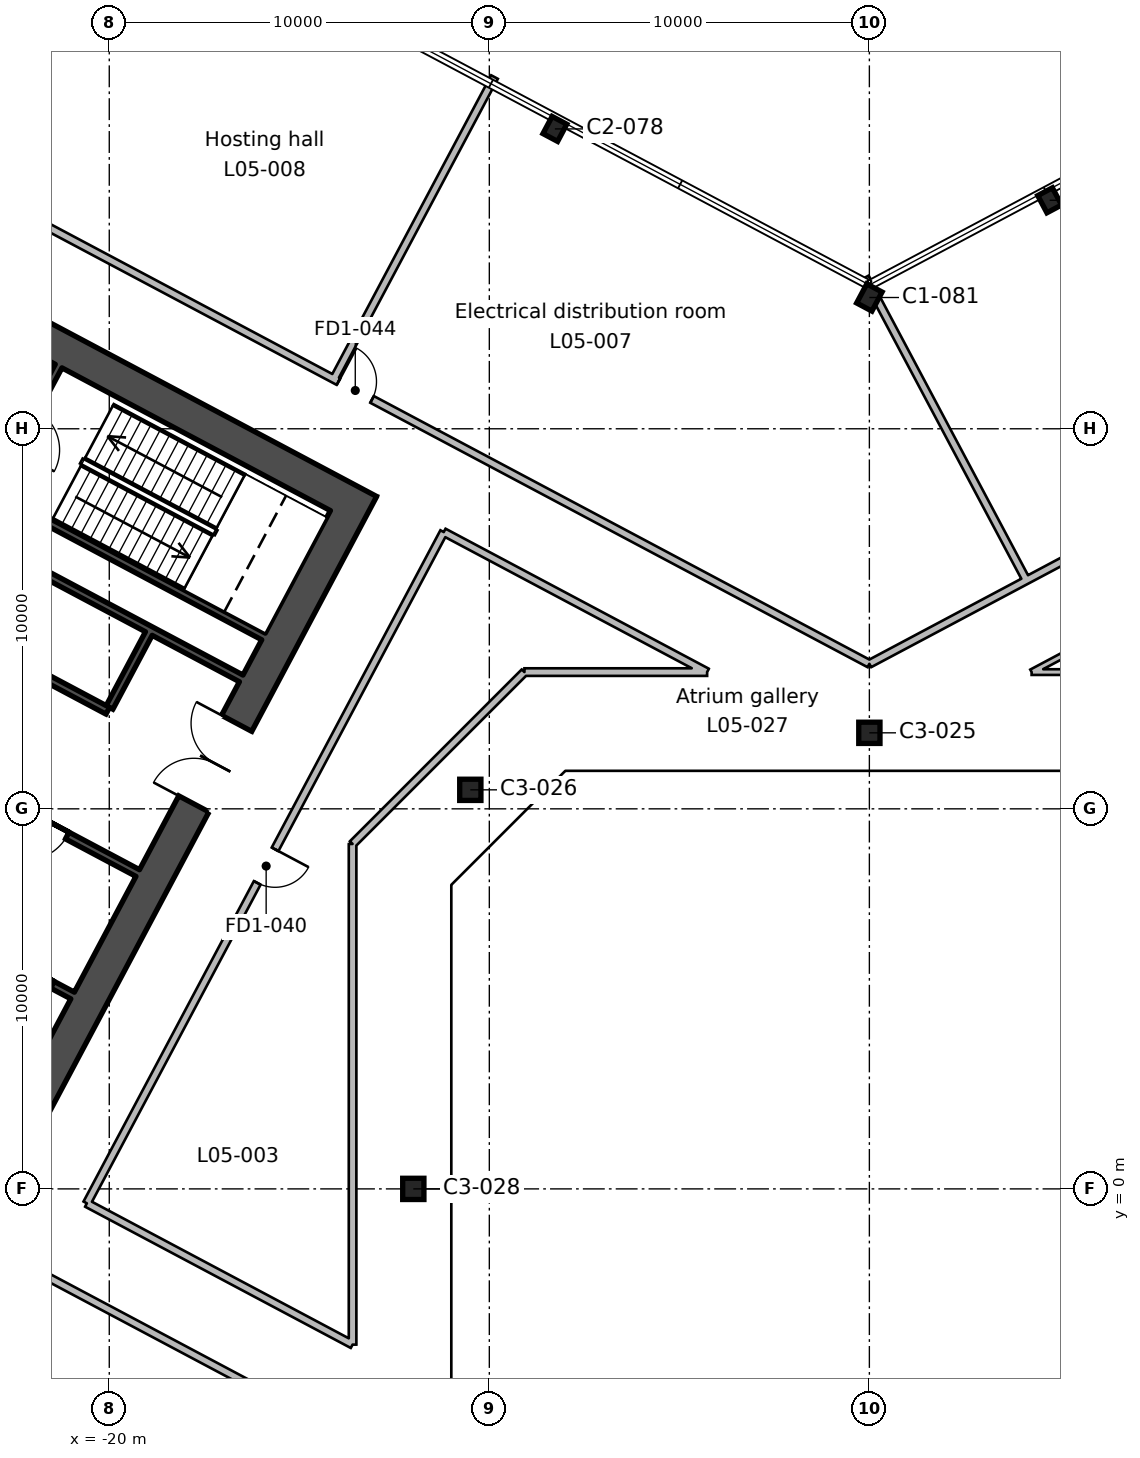
"""IFC4 building model, lengths in metres.
Left out: names, types, materials, properties, quantities, classifications, styles, units other than length and angle.
Written with IfcOpenShell. Run it as: python <this file> out.ifc"""

import sys

from ifc_helpers import new_model, si_unit, direction, frame, frame_2d, origin, origin_2d, place, context, subcontext, project, spatial, rectangle, hollow_rectangle, i_section, extrude, element, fill, save


model = new_model("IFC4")
c1 = context("Model", 3, precision=1e-05, world=origin(), true_north=direction((0.0, 1.0)))
c2 = subcontext(c1, "Body", "Model", "MODEL_VIEW")
j1 = project(units=[si_unit("LENGTHUNIT", "METRE"), si_unit("PLANEANGLEUNIT", "RADIAN")], contexts=[c1])
p1 = place(None, origin())
s1 = spatial("IfcSite", under=j1, at=p1, CompositionType="ELEMENT")
p2 = place(p1, origin())
s2 = spatial("IfcBuilding", under=s1, at=p2, CompositionType="ELEMENT")
p3 = place(p2, frame((0.0, 0.0, 28.4)))
s3 = spatial("IfcBuildingStorey", under=s2, at=p3, CompositionType="ELEMENT", Elevation=28.4)
for number, where, z_axis, x_axis in (
    (1, (-12.0, 0.0, 0.0), (0.0, 0.0, 1.0), (1.0, 0.0, 0.0)),
    (2, (-10.5, 10.5, 0.0), (0.0, 0.0, 1.0), (1.0, 0.0, 0.0)),
    (3, (0.0, 12.0, 0.0), (0.0, 0.0, 1.0), (1.0, 0.0, 0.0)),
):
    element("IfcColumn", number, at=place(p3, frame(where, z_axis=z_axis, x_axis=x_axis)), inside=s3, PredefinedType="COLUMN", context=c2, shape_type="SweptSolid", body=[
        extrude(hollow_rectangle(XDim=0.559, YDim=0.559, WallThickness=0.024, InnerFilletRadius=0.012, OuterFilletRadius=0.035, at=origin_2d()), origin(), (0.0, 0.0, 1.0), 5.4),
    ])
p4 = place(p3, frame((0.0, 23.454, 0.0), z_axis=(0.0, 0.0, 1.0), x_axis=(-0.882947592859, 0.469471562786, 0.0)))
e4 = element("IfcColumn", 4, at=p4, inside=s3, PredefinedType="COLUMN", context=c2, shape_type="SweptSolid", body=[
    extrude(i_section(OverallWidth=0.455, OverallDepth=0.569, WebThickness=0.078, FlangeThickness=0.125, FilletRadius=0.015, at=origin_2d()), origin(), (0.0, 0.0, 1.0), 5.4),
])
for number, where, z_axis, x_axis in (
    (5, (4.744, 26.012, 0.0), (0.0, 0.0, 1.0), (-0.883, -0.469, 0.0)),
    (6, (-8.275, 27.89, 0.0), (0.0, 0.0, 1.0), (-0.883, 0.469, 0.0)),
):
    element("IfcColumn", number, at=place(p3, frame(where, z_axis=z_axis, x_axis=x_axis)), inside=s3, PredefinedType="COLUMN", context=c2, shape_type="SweptSolid", body=[
        extrude(i_section(OverallWidth=0.437, OverallDepth=0.513, WebThickness=0.061, FlangeThickness=0.097, FilletRadius=0.015, at=origin_2d()), origin(), (0.0, 0.0, 1.0), 5.4),
    ])
p5 = place(p3, frame((-13.362, 18.43, 0.0), z_axis=(0.0, 0.0, 1.0), x_axis=(-0.46947084998, -0.882947971864, 0.0)))
e7 = element("IfcWall", 7, at=p5, inside=s3, PredefinedType="SHEAR", context=c2, shape_type="SweptSolid", body=[
    extrude(rectangle(XDim=20.0, YDim=0.9, at=frame_2d((10.0, 0.0))), origin(), (0.0, 0.0, 1.0), 5.4),
])
p6 = place(p5, frame((7.0, 0.0, 0.0)))
e8 = element("IfcOpeningElement", 8, at=p6, cuts=e7, PredefinedType="OPENING", context=c2, shape_type="SweptSolid", body=[
    extrude(rectangle(XDim=2.4, YDim=2.4, at=frame_2d((1.2, 1.2))), frame((0.0, 0.46, 0.0), z_axis=(0.0, -1.0, 0.0), x_axis=(1.0, 0.0, 0.0)), (0.0, 0.0, 1.0), 0.92),
])
p7 = place(p3, frame((-13.97, 18.244, 0.0), z_axis=(0.0, 0.0, 1.0), x_axis=(-0.88294509198, 0.469476266226, 0.0)))
e9 = element("IfcWall", 9, at=p7, inside=s3, PredefinedType="SHEAR", context=c2, shape_type="SweptSolid", body=[
    extrude(rectangle(XDim=20.2, YDim=0.9, at=frame_2d((10.1, 0.0))), origin(), (0.0, 0.0, 1.0), 5.4),
])
p8 = place(p3, frame((-18.96, 14.611, 0.0), z_axis=(0.0, 0.0, 1.0), x_axis=(-0.4694473164, -0.882960484464, 0.0)))
e10 = element("IfcWall", 10, at=p8, inside=s3, PredefinedType="SHEAR", context=c2, shape_type="SweptSolid", body=[
    extrude(rectangle(XDim=2.2, YDim=0.2, at=frame_2d((1.1, 0.0))), origin(), (0.0, 0.0, 1.0), 5.4),
])
p9 = place(p3, frame((-21.333, 21.649, 0.0), z_axis=(0.0, 0.0, 1.0), x_axis=(-0.469494272526, -0.882935517501, 0.0)))
e11 = element("IfcWall", 11, at=p9, inside=s3, PredefinedType="SHEAR", context=c2, shape_type="SweptSolid", body=[
    extrude(rectangle(XDim=7.3, YDim=0.2, at=frame_2d((3.65, 0.0))), origin(), (0.0, 0.0, 1.0), 5.4),
])
p10 = place(p9, frame((1.3, 0.0, 0.0)))
e12 = element("IfcOpeningElement", 12, at=p10, cuts=e11, PredefinedType="OPENING", context=c2, shape_type="SweptSolid", body=[
    extrude(rectangle(XDim=1.2, YDim=2.1, at=frame_2d((0.6, 1.05))), frame((0.0, 0.11, 0.0), z_axis=(0.0, -1.0, 0.0), x_axis=(1.0, 0.0, 0.0)), (0.0, 0.0, 1.0), 0.22),
])
p11 = place(p3, frame((-15.942, 14.536, 0.0), z_axis=(0.0, 0.0, 1.0), x_axis=(-0.882946947542, 0.469472776449, 0.0)))
e13 = element("IfcWall", 13, at=p11, inside=s3, PredefinedType="SHEAR", context=c2, shape_type="SweptSolid", body=[
    extrude(rectangle(XDim=8.0, YDim=0.2, at=frame_2d((4.0, 0.0))), origin(), (0.0, 0.0, 1.0), 5.4),
])
p12 = place(p3, frame((-16.529, 13.432, 0.0), z_axis=(0.0, 0.0, 1.0), x_axis=(-0.88295287151, 0.469461634952, 0.0)))
e14 = element("IfcWall", 14, at=p12, inside=s3, PredefinedType="SHEAR", context=c2, shape_type="SweptSolid", body=[
    extrude(rectangle(XDim=8.0, YDim=0.2, at=frame_2d((4.0, 0.0))), origin(), (0.0, 0.0, 1.0), 5.4),
])
p13 = place(p3, frame((-20.04, 12.581, 0.0), z_axis=(0.0, 0.0, 1.0), x_axis=(-0.882942972946, 0.469480251476, 0.0)))
e15 = element("IfcWall", 15, at=p13, inside=s3, PredefinedType="SHEAR", context=c2, shape_type="SweptSolid", body=[
    extrude(rectangle(XDim=5.4, YDim=0.2, at=frame_2d((2.7, 0.0))), origin(), (0.0, 0.0, 1.0), 5.4),
])
p14 = place(p13, frame((2.25, 0.0, 0.0)))
e16 = element("IfcOpeningElement", 16, at=p14, cuts=e15, PredefinedType="OPENING", context=c2, shape_type="SweptSolid", body=[
    extrude(rectangle(XDim=0.9, YDim=2.1, at=frame_2d((0.45, 1.05))), frame((0.0, 0.11, 0.0), z_axis=(0.0, -1.0, 0.0), x_axis=(1.0, 0.0, 0.0)), (0.0, 0.0, 1.0), 0.22),
])
p15 = place(p3, frame((-19.252, 8.311, 0.0), z_axis=(0.0, 0.0, 1.0), x_axis=(-0.882955722218, 0.469456273365, 0.0)))
e17 = element("IfcWall", 17, at=p15, inside=s3, PredefinedType="SHEAR", context=c2, shape_type="SweptSolid", body=[
    extrude(rectangle(XDim=10.0, YDim=0.2, at=frame_2d((5.0, 0.0))), origin(), (0.0, 0.0, 1.0), 5.4),
])
p16 = place(p15, frame((2.1, 0.0, 0.0)))
e18 = element("IfcOpeningElement", 18, at=p16, cuts=e17, PredefinedType="OPENING", context=c2, shape_type="SweptSolid", body=[
    extrude(rectangle(XDim=1.2, YDim=2.1, at=frame_2d((0.6, 1.05))), frame((0.0, 0.11, 0.0), z_axis=(0.0, -1.0, 0.0), x_axis=(1.0, 0.0, 0.0)), (0.0, 0.0, 1.0), 0.22),
])
p17 = place(p3, frame((-20.965, 5.088, 0.0), z_axis=(0.0, 0.0, 1.0), x_axis=(-0.882925986334, 0.469512196493, 0.0)))
e19 = element("IfcWall", 19, at=p17, inside=s3, PredefinedType="SHEAR", context=c2, shape_type="SweptSolid", body=[
    extrude(rectangle(XDim=4.5, YDim=0.2, at=frame_2d((2.25, 0.0))), origin(), (0.0, 0.0, 1.0), 5.4),
])
p18 = place(p17, frame((0.6, 0.0, 0.0)))
e20 = element("IfcOpeningElement", 20, at=p18, cuts=e19, PredefinedType="OPENING", context=c2, shape_type="SweptSolid", body=[
    extrude(rectangle(XDim=1.1, YDim=2.1, at=frame_2d((0.55, 1.05))), frame((0.0, 0.11, 0.0), z_axis=(0.0, -1.0, 0.0), x_axis=(1.0, 0.0, 0.0)), (0.0, 0.0, 1.0), 0.22),
])
p19 = place(p3, frame((-48.814, 39.77, 0.0), z_axis=(0.0, 0.0, 1.0), x_axis=(0.882945848707, -0.469474843043, 0.0)))
e21 = element("IfcWall", 21, at=p19, inside=s3, PredefinedType="PARTITIONING", context=c2, shape_type="SweptSolid", body=[
    extrude(rectangle(XDim=55.285, YDim=0.2, at=frame_2d((27.643, 0.0))), origin(), (0.0, 0.0, 1.0), 4.95),
])
p20 = place(p19, frame((39.465, 0.0, 0.0)))
e22 = element("IfcOpeningElement", 22, at=p20, cuts=e21, PredefinedType="OPENING", context=c2, shape_type="SweptSolid", body=[
    extrude(rectangle(XDim=1.0, YDim=2.1, at=frame_2d((0.5, 1.05))), frame((0.0, 0.11, 0.0), z_axis=(0.0, -1.0, 0.0), x_axis=(1.0, 0.0, 0.0)), (0.0, 0.0, 1.0), 0.22),
])
p21 = place(p19, frame((27.366, 0.0, 0.0)))
e23 = element("IfcOpeningElement", 23, at=p21, cuts=e21, PredefinedType="OPENING", context=c2, shape_type="SweptSolid", body=[
    extrude(rectangle(XDim=1.0, YDim=2.1, at=frame_2d((0.5, 1.05))), frame((0.0, 0.11, 0.0), z_axis=(0.0, -1.0, 0.0), x_axis=(1.0, 0.0, 0.0)), (0.0, 0.0, 1.0), 0.22),
])
p22 = place(p19, frame((15.665, 0.0, 0.0)))
e24 = element("IfcOpeningElement", 24, at=p22, cuts=e21, PredefinedType="OPENING", context=c2, shape_type="SweptSolid", body=[
    extrude(rectangle(XDim=1.0, YDim=2.1, at=frame_2d((0.5, 1.05))), frame((0.0, 0.11, 0.0), z_axis=(0.0, -1.0, 0.0), x_axis=(1.0, 0.0, 0.0)), (0.0, 0.0, 1.0), 0.22),
])
p23 = place(p3, frame((0.0, 13.815, 0.0), z_axis=(0.0, 0.0, 1.0), x_axis=(0.882946053005, 0.469474458819, 0.0)))
e25 = element("IfcWall", 25, at=p23, inside=s3, PredefinedType="PARTITIONING", context=c2, shape_type="SweptSolid", body=[
    extrude(rectangle(XDim=65.714, YDim=0.2, at=frame_2d((32.857, 0.0))), origin(), (0.0, 0.0, 1.0), 4.95),
])
p24 = place(p23, frame((35.65, 0.0, 0.0)))
e26 = element("IfcOpeningElement", 26, at=p24, cuts=e25, PredefinedType="OPENING", context=c2, shape_type="SweptSolid", body=[
    extrude(rectangle(XDim=1.0, YDim=2.1, at=frame_2d((0.5, 1.05))), frame((0.0, 0.11, 0.0), z_axis=(0.0, -1.0, 0.0), x_axis=(1.0, 0.0, 0.0)), (0.0, 0.0, 1.0), 0.22),
])
p25 = place(p23, frame((32.15, 0.0, 0.0)))
e27 = element("IfcOpeningElement", 27, at=p25, cuts=e25, PredefinedType="OPENING", context=c2, shape_type="SweptSolid", body=[
    extrude(rectangle(XDim=1.0, YDim=2.1, at=frame_2d((0.5, 1.05))), frame((0.0, 0.11, 0.0), z_axis=(0.0, -1.0, 0.0), x_axis=(1.0, 0.0, 0.0)), (0.0, 0.0, 1.0), 0.22),
])
p26 = place(p23, frame((19.25, 0.0, 0.0)))
e28 = element("IfcOpeningElement", 28, at=p26, cuts=e25, PredefinedType="OPENING", context=c2, shape_type="SweptSolid", body=[
    extrude(rectangle(XDim=1.0, YDim=2.1, at=frame_2d((0.5, 1.05))), frame((0.0, 0.11, 0.0), z_axis=(0.0, -1.0, 0.0), x_axis=(1.0, 0.0, 0.0)), (0.0, 0.0, 1.0), 0.22),
])
p27 = place(p3, frame((-13.598, -6.585, 0.0), z_axis=(0.0, 0.0, 1.0), x_axis=(-0.882949042681, 0.469468836057, 0.0)))
e29 = element("IfcWall", 29, at=p27, inside=s3, PredefinedType="PARTITIONING", context=c2, shape_type="SweptSolid", body=[
    extrude(rectangle(XDim=35.059, YDim=0.2, at=frame_2d((17.529, 0.0))), origin(), (0.0, 0.0, 1.0), 4.95),
])
p28 = place(p27, frame((25.65, 0.0, 0.0)))
e30 = element("IfcOpeningElement", 30, at=p28, cuts=e29, PredefinedType="OPENING", context=c2, shape_type="SweptSolid", body=[
    extrude(rectangle(XDim=1.0, YDim=2.1, at=frame_2d((0.5, 1.05))), frame((0.0, 0.11, 0.0), z_axis=(0.0, -1.0, 0.0), x_axis=(1.0, 0.0, 0.0)), (0.0, 0.0, 1.0), 0.22),
])
p29 = place(p27, frame((17.05, 0.0, 0.0)))
e31 = element("IfcOpeningElement", 31, at=p29, cuts=e29, PredefinedType="OPENING", context=c2, shape_type="SweptSolid", body=[
    extrude(rectangle(XDim=1.0, YDim=2.1, at=frame_2d((0.5, 1.05))), frame((0.0, 0.11, 0.0), z_axis=(0.0, -1.0, 0.0), x_axis=(1.0, 0.0, 0.0)), (0.0, 0.0, 1.0), 0.22),
])
p30 = place(p3, frame((-9.864, 29.255, 0.0), z_axis=(0.0, 0.0, 1.0), x_axis=(-0.469475779988, -0.88294535052, 0.0)))
e32 = element("IfcWall", 32, at=p30, inside=s3, PredefinedType="PARTITIONING", context=c2, shape_type="SweptSolid", body=[
    extrude(rectangle(XDim=9.002, YDim=0.2, at=frame_2d((4.501, 0.0))), origin(), (0.0, 0.0, 1.0), 4.95),
])
p31 = place(p3, frame((-0.106, 23.984, 0.0), z_axis=(0.0, 0.0, 1.0), x_axis=(0.469539420252, -0.882911509059, 0.0)))
e33 = element("IfcWall", 33, at=p31, inside=s3, PredefinedType="PARTITIONING", context=c2, shape_type="SweptSolid", body=[
    extrude(rectangle(XDim=9.028, YDim=0.2, at=frame_2d((4.514, 0.0))), origin(), (0.0, 0.0, 1.0), 4.95),
])
p32 = place(p3, frame((-20.59, -0.38, 0.0), z_axis=(0.0, 0.0, 1.0), x_axis=(0.4694565083, 0.882955597306, 0.0)))
e34 = element("IfcWall", 34, at=p32, inside=s3, PredefinedType="PARTITIONING", context=c2, shape_type="SweptSolid", body=[
    extrude(rectangle(XDim=20.004, YDim=0.2, at=frame_2d((10.002, 0.0))), origin(), (0.0, 0.0, 1.0), 4.95),
])
p33 = place(p32, frame((9.55, 0.0, 0.0)))
e35 = element("IfcOpeningElement", 35, at=p33, cuts=e34, PredefinedType="OPENING", context=c2, shape_type="SweptSolid", body=[
    extrude(rectangle(XDim=1.0, YDim=2.1, at=frame_2d((0.5, 1.05))), frame((0.0, 0.11, 0.0), z_axis=(0.0, -1.0, 0.0), x_axis=(1.0, 0.0, 0.0)), (0.0, 0.0, 1.0), 0.22),
])
p34 = place(p3, frame((-11.199, 17.283, 0.0), z_axis=(0.0, 0.0, 1.0), x_axis=(0.88292918263, -0.469506185754, 0.0)))
e36 = element("IfcWall", 36, at=p34, inside=s3, PredefinedType="PARTITIONING", context=c2, shape_type="SweptSolid", body=[
    extrude(rectangle(XDim=7.849, YDim=0.2, at=frame_2d((3.924, 0.0))), origin(), (0.0, 0.0, 1.0), 4.95),
])
p35 = place(p3, frame((-4.269, 13.598, 0.0), z_axis=(0.0, 0.0, 1.0), x_axis=(-1.0, 0.0, 0.0)))
e37 = element("IfcWall", 37, at=p35, inside=s3, PredefinedType="PARTITIONING", context=c2, shape_type="SweptSolid", body=[
    extrude(rectangle(XDim=4.807, YDim=0.2, at=frame_2d((2.403, 0.0))), origin(), (0.0, 0.0, 1.0), 4.95),
])
p36 = place(p3, frame((-9.076, 13.598, 0.0), z_axis=(0.0, 0.0, 1.0), x_axis=(-0.707106781187, -0.707106781187, 0.0)))
e38 = element("IfcWall", 38, at=p36, inside=s3, PredefinedType="PARTITIONING", context=c2, shape_type="SweptSolid", body=[
    extrude(rectangle(XDim=6.395, YDim=0.2, at=frame_2d((3.198, 0.0))), origin(), (0.0, 0.0, 1.0), 4.95),
])
p37 = place(p3, frame((-13.598, 9.076, 0.0), z_axis=(0.0, 0.0, 1.0), x_axis=(0.0, -1.0, 0.0)))
e39 = element("IfcWall", 39, at=p37, inside=s3, PredefinedType="PARTITIONING", context=c2, shape_type="SweptSolid", body=[
    extrude(rectangle(XDim=13.174, YDim=0.2, at=frame_2d((6.587, 0.0))), origin(), (0.0, 0.0, 1.0), 4.95),
])
p38 = place(p3, frame((-13.598, -4.098, 0.0), z_axis=(0.0, 0.0, 1.0), x_axis=(-0.88293683418, 0.469491796359, 0.0)))
e40 = element("IfcWall", 40, at=p38, inside=s3, PredefinedType="PARTITIONING", context=c2, shape_type="SweptSolid", body=[
    extrude(rectangle(XDim=7.919, YDim=0.2, at=frame_2d((3.959, 0.0))), origin(), (0.0, 0.0, 1.0), 4.95),
])
p39 = place(p3, frame((7.667, 15.405, 0.0), z_axis=(0.0, 0.0, 1.0), x_axis=(-0.88290372476, -0.469554057384, 0.0)))
e41 = element("IfcWall", 41, at=p39, inside=s3, PredefinedType="PARTITIONING", context=c2, shape_type="SweptSolid", body=[
    extrude(rectangle(XDim=3.849, YDim=0.15, at=frame_2d((1.924, 0.0))), origin(), (0.0, 0.0, 1.0), 4.95),
])
p40 = place(p3, frame((4.269, 13.598, 0.0), z_axis=(0.0, 0.0, 1.0), x_axis=(1.0, 0.0, 0.0)))
e42 = element("IfcWall", 42, at=p40, inside=s3, PredefinedType="PARTITIONING", context=c2, shape_type="SweptSolid", body=[
    extrude(rectangle(XDim=4.359, YDim=0.15, at=frame_2d((2.179, 0.0))), origin(), (0.0, 0.0, 1.0), 4.95),
])
p41 = place(p6, frame((2.4, 0.0, 0.0), z_axis=(0.0, 0.0, 1.0), x_axis=(-1.0, 0.0, 0.0)))
e43 = element("IfcDoor", 43, at=p41, inside=s3, OperationType="DOUBLE_DOOR_SINGLE_SWING", PredefinedType="DOOR", context=c2, shape_type="SweptSolid", body=[
    extrude(rectangle(XDim=2.4, YDim=2.4, at=frame_2d((1.2, 1.2))), frame((0.0, 0.025, 0.0), z_axis=(0.0, -1.0, 0.0), x_axis=(1.0, 0.0, 0.0)), (0.0, 0.0, 1.0), 0.05),
])
fill(e8, e43)
p42 = place(p16, origin())
e44 = element("IfcDoor", 44, at=p42, inside=s3, OperationType="SINGLE_SWING_RIGHT", PredefinedType="DOOR", context=c2, shape_type="SweptSolid", body=[
    extrude(rectangle(XDim=1.2, YDim=2.1, at=frame_2d((0.6, 1.05))), frame((0.0, 0.025, 0.0), z_axis=(0.0, -1.0, 0.0), x_axis=(1.0, 0.0, 0.0)), (0.0, 0.0, 1.0), 0.05),
])
fill(e18, e44)
p43 = place(p18, origin())
e45 = element("IfcDoor", 45, at=p43, inside=s3, OperationType="DOUBLE_DOOR_SLIDING", PredefinedType="DOOR", context=c2, shape_type="SweptSolid", body=[
    extrude(rectangle(XDim=1.1, YDim=2.1, at=frame_2d((0.55, 1.05))), frame((0.0, 0.025, 0.0), z_axis=(0.0, -1.0, 0.0), x_axis=(1.0, 0.0, 0.0)), (0.0, 0.0, 1.0), 0.05),
])
fill(e20, e45)
p44 = place(p33, frame((1.0, 0.0, 0.0), z_axis=(0.0, 0.0, 1.0), x_axis=(-1.0, 0.0, 0.0)))
e46 = element("IfcDoor", 46, at=p44, inside=s3, OperationType="SINGLE_SWING_LEFT", PredefinedType="DOOR", context=c2, shape_type="SweptSolid", body=[
    extrude(rectangle(XDim=1.0, YDim=2.1, at=frame_2d((0.5, 1.05))), frame((0.0, 0.025, 0.0), z_axis=(0.0, -1.0, 0.0), x_axis=(1.0, 0.0, 0.0)), (0.0, 0.0, 1.0), 0.05),
])
fill(e35, e46)
p45 = place(p20, origin())
e47 = element("IfcDoor", 47, at=p45, inside=s3, OperationType="SINGLE_SWING_LEFT", PredefinedType="DOOR", context=c2, shape_type="SweptSolid", body=[
    extrude(rectangle(XDim=1.0, YDim=2.1, at=frame_2d((0.5, 1.05))), frame((0.0, 0.025, 0.0), z_axis=(0.0, -1.0, 0.0), x_axis=(1.0, 0.0, 0.0)), (0.0, 0.0, 1.0), 0.05),
])
fill(e22, e47)
save(model, sys.argv[1])
